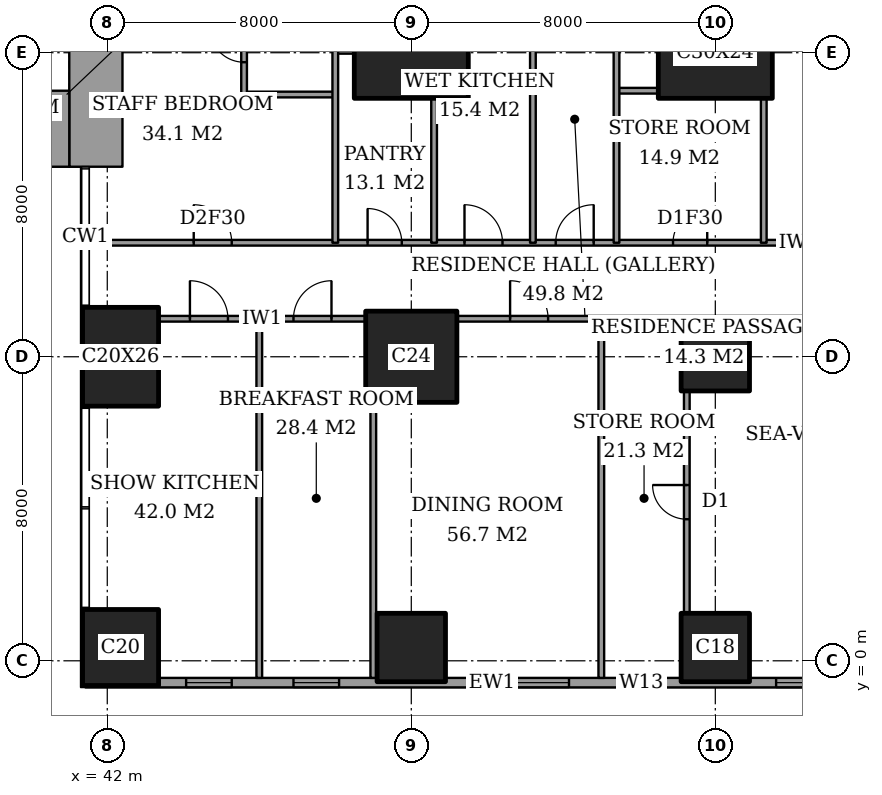
"""IFC4 building model, lengths in metres.
Left out: names, types, materials, properties, quantities, classifications, styles, units other than length and angle.
Written with IfcOpenShell. Run it as: python <this file> out.ifc"""

import sys

from ifc_helpers import new_model, si_unit, direction, frame, frame_2d, origin, origin_2d, place, context, subcontext, project, spatial, rectangle, extrude, element, fill, save


model = new_model("IFC4")
c1 = context("Model", 3, precision=1e-05, world=origin(), true_north=direction((0.0, 1.0)))
c2 = subcontext(c1, "Body", "Model", "MODEL_VIEW")
j1 = project(units=[si_unit("LENGTHUNIT", "METRE"), si_unit("PLANEANGLEUNIT", "RADIAN")], contexts=[c1])
p1 = place(None, origin())
s1 = spatial("IfcSite", under=j1, at=p1, CompositionType="ELEMENT")
p2 = place(p1, origin())
s2 = spatial("IfcBuilding", under=s1, at=p2, CompositionType="ELEMENT")
p3 = place(p2, frame((0.0, 0.0, 218.2)))
s3 = spatial("IfcBuildingStorey", under=s2, at=p3, CompositionType="ELEMENT", Elevation=218.2)
p4 = place(p3, frame((42.35, 0.35, 0.0), z_axis=(0.0, 0.0, 1.0), x_axis=(1.0, 0.0, 0.0)))
e1 = element("IfcColumn", 1, at=p4, inside=s3, PredefinedType="COLUMN", context=c2, shape_type="SweptSolid", body=[
    extrude(rectangle(XDim=2.0, YDim=2.0, at=origin_2d()), origin(), (0.0, 0.0, 1.0), 3.6),
])
p5 = place(p3, frame((42.35, 8.0, 0.0), z_axis=(0.0, 0.0, 1.0), x_axis=(1.0, 0.0, 0.0)))
e2 = element("IfcColumn", 2, at=p5, inside=s3, PredefinedType="COLUMN", context=c2, shape_type="SweptSolid", body=[
    extrude(rectangle(XDim=2.0, YDim=2.6, at=origin_2d()), origin(), (0.0, 0.0, 1.0), 3.6),
])
p6 = place(p3, frame((50.0, 0.35, 0.0), z_axis=(0.0, 0.0, 1.0), x_axis=(1.0, 0.0, 0.0)))
e3 = element("IfcColumn", 3, at=p6, inside=s3, PredefinedType="COLUMN", context=c2, shape_type="SweptSolid", body=[
    extrude(rectangle(XDim=1.8, YDim=1.8, at=origin_2d()), origin(), (0.0, 0.0, 1.0), 3.6),
])
p7 = place(p3, frame((50.0, 8.0, 0.0), z_axis=(0.0, 0.0, 1.0), x_axis=(1.0, 0.0, 0.0)))
e4 = element("IfcColumn", 4, at=p7, inside=s3, PredefinedType="COLUMN", context=c2, shape_type="SweptSolid", body=[
    extrude(rectangle(XDim=2.4, YDim=2.4, at=origin_2d()), origin(), (0.0, 0.0, 1.0), 3.6),
])
p8 = place(p3, frame((50.0, 16.0, 0.0), z_axis=(0.0, 0.0, 1.0), x_axis=(1.0, 0.0, 0.0)))
e5 = element("IfcColumn", 5, at=p8, inside=s3, PredefinedType="COLUMN", context=c2, shape_type="SweptSolid", body=[
    extrude(rectangle(XDim=3.0, YDim=2.4, at=origin_2d()), origin(), (0.0, 0.0, 1.0), 3.6),
])
for number, where, z_axis, x_axis in (
    (6, (58.0, 0.35, 0.0), (0.0, 0.0, 1.0), (1.0, 0.0, 0.0)),
    (7, (58.0, 8.0, 0.0), (0.0, 0.0, 1.0), (1.0, 0.0, 0.0)),
):
    element("IfcColumn", number, at=place(p3, frame(where, z_axis=z_axis, x_axis=x_axis)), inside=s3, PredefinedType="COLUMN", context=c2, shape_type="SweptSolid", body=[
        extrude(rectangle(XDim=1.8, YDim=1.8, at=origin_2d()), origin(), (0.0, 0.0, 1.0), 3.6),
    ])
p9 = place(p3, frame((58.0, 16.0, 0.0), z_axis=(0.0, 0.0, 1.0), x_axis=(1.0, 0.0, 0.0)))
e8 = element("IfcColumn", 8, at=p9, inside=s3, PredefinedType="COLUMN", context=c2, shape_type="SweptSolid", body=[
    extrude(rectangle(XDim=3.0, YDim=2.4, at=origin_2d()), origin(), (0.0, 0.0, 1.0), 3.6),
])
p10 = place(p3, frame((37.85, 14.0, 0.0), z_axis=(0.0, 0.0, 1.0), x_axis=(1.0, 0.0, 0.0)))
e9 = element("IfcWall", 9, at=p10, inside=s3, PredefinedType="SHEAR", context=c2, shape_type="SweptSolid", body=[
    extrude(rectangle(XDim=3.15, YDim=2.0, at=frame_2d((1.575, 0.0))), origin(), (0.0, 0.0, 1.0), 3.6),
])
p11 = place(p3, frame((41.7, 13.0, 0.0), z_axis=(0.0, 0.0, 1.0), x_axis=(0.0, 1.0, 0.0)))
e10 = element("IfcWall", 10, at=p11, inside=s3, PredefinedType="SHEAR", context=c2, shape_type="SweptSolid", body=[
    extrude(rectangle(XDim=11.85, YDim=1.4, at=frame_2d((5.925, 0.0))), origin(), (0.0, 0.0, 1.0), 3.6),
])
p12 = place(p11, frame((7.5, 0.0, 0.0)))
e11 = element("IfcOpeningElement", 11, at=p12, cuts=e10, PredefinedType="OPENING", context=c2, shape_type="SweptSolid", body=[
    extrude(rectangle(XDim=1.8, YDim=2.4, at=frame_2d((0.9, 1.2))), frame((0.0, 0.71, 0.0), z_axis=(0.0, -1.0, 0.0), x_axis=(1.0, 0.0, 0.0)), (0.0, 0.0, 1.0), 1.42),
])
p13 = place(p3, frame((41.425, -0.575, 0.0), z_axis=(0.0, 0.0, 1.0), x_axis=(1.0, 0.0, 0.0)))
e12 = element("IfcWall", 12, at=p13, inside=s3, PredefinedType="SOLIDWALL", context=c2, shape_type="SweptSolid", body=[
    extrude(rectangle(XDim=21.4, YDim=0.25, at=frame_2d((10.7, 0.0))), origin(), (0.0, 0.0, 1.0), 3.6),
])
p14 = place(p13, frame((2.65, 0.0, 0.2)))
e13 = element("IfcOpeningElement", 13, at=p14, cuts=e12, PredefinedType="OPENING", context=c2, shape_type="SweptSolid", body=[
    extrude(rectangle(XDim=1.2, YDim=2.4, at=frame_2d((0.6, 1.2))), frame((0.0, 0.135, 0.0), z_axis=(0.0, -1.0, 0.0), x_axis=(1.0, 0.0, 0.0)), (0.0, 0.0, 1.0), 0.27),
])
p15 = place(p13, frame((5.475, 0.0, 0.2)))
e14 = element("IfcOpeningElement", 14, at=p15, cuts=e12, PredefinedType="OPENING", context=c2, shape_type="SweptSolid", body=[
    extrude(rectangle(XDim=1.2, YDim=2.4, at=frame_2d((0.6, 1.2))), frame((0.0, 0.135, 0.0), z_axis=(0.0, -1.0, 0.0), x_axis=(1.0, 0.0, 0.0)), (0.0, 0.0, 1.0), 0.27),
])
p16 = place(p13, frame((10.325, 0.0, 0.2)))
e15 = element("IfcOpeningElement", 15, at=p16, cuts=e12, PredefinedType="OPENING", context=c2, shape_type="SweptSolid", body=[
    extrude(rectangle(XDim=2.4, YDim=2.4, at=frame_2d((1.2, 1.2))), frame((0.0, 0.135, 0.0), z_axis=(0.0, -1.0, 0.0), x_axis=(1.0, 0.0, 0.0)), (0.0, 0.0, 1.0), 0.27),
])
p17 = place(p13, frame((14.025, 0.0, 0.2)))
e16 = element("IfcOpeningElement", 16, at=p17, cuts=e12, PredefinedType="OPENING", context=c2, shape_type="SweptSolid", body=[
    extrude(rectangle(XDim=1.2, YDim=2.4, at=frame_2d((0.6, 1.2))), frame((0.0, 0.135, 0.0), z_axis=(0.0, -1.0, 0.0), x_axis=(1.0, 0.0, 0.0)), (0.0, 0.0, 1.0), 0.27),
])
p18 = place(p13, frame((18.175, 0.0, 0.2)))
e17 = element("IfcOpeningElement", 17, at=p18, cuts=e12, PredefinedType="OPENING", context=c2, shape_type="SweptSolid", body=[
    extrude(rectangle(XDim=2.4, YDim=2.4, at=frame_2d((1.2, 1.2))), frame((0.0, 0.135, 0.0), z_axis=(0.0, -1.0, 0.0), x_axis=(1.0, 0.0, 0.0)), (0.0, 0.0, 1.0), 0.27),
])
p19 = place(p3, frame((43.35, 9.0, 0.0), z_axis=(0.0, 0.0, 1.0), x_axis=(1.0, 0.0, 0.0)))
e18 = element("IfcWall", 18, at=p19, inside=s3, PredefinedType="PARTITIONING", context=c2, shape_type="SweptSolid", body=[
    extrude(rectangle(XDim=5.45, YDim=0.15, at=frame_2d((2.725, 0.0))), origin(), (0.0, 0.0, 1.0), 3.35),
])
p20 = place(p19, frame((3.55, 0.0, 0.0)))
e19 = element("IfcOpeningElement", 19, at=p20, cuts=e18, PredefinedType="OPENING", context=c2, shape_type="SweptSolid", body=[
    extrude(rectangle(XDim=1.0, YDim=2.1, at=frame_2d((0.5, 1.05))), frame((0.0, 0.085, 0.0), z_axis=(0.0, -1.0, 0.0), x_axis=(1.0, 0.0, 0.0)), (0.0, 0.0, 1.0), 0.17),
])
p21 = place(p19, frame((0.825, 0.0, 0.0)))
e20 = element("IfcOpeningElement", 20, at=p21, cuts=e18, PredefinedType="OPENING", context=c2, shape_type="SweptSolid", body=[
    extrude(rectangle(XDim=1.0, YDim=2.1, at=frame_2d((0.5, 1.05))), frame((0.0, 0.085, 0.0), z_axis=(0.0, -1.0, 0.0), x_axis=(1.0, 0.0, 0.0)), (0.0, 0.0, 1.0), 0.17),
])
p22 = place(p3, frame((51.2, 9.0, 0.0), z_axis=(0.0, 0.0, 1.0), x_axis=(1.0, 0.0, 0.0)))
e21 = element("IfcWall", 21, at=p22, inside=s3, PredefinedType="PARTITIONING", context=c2, shape_type="SweptSolid", body=[
    extrude(rectangle(XDim=15.25, YDim=0.15, at=frame_2d((7.625, 0.0))), origin(), (0.0, 0.0, 1.0), 3.35),
])
p23 = place(p22, frame((10.15, 0.0, 0.0)))
e22 = element("IfcOpeningElement", 22, at=p23, cuts=e21, PredefinedType="OPENING", context=c2, shape_type="SweptSolid", body=[
    extrude(rectangle(XDim=1.0, YDim=2.1, at=frame_2d((0.5, 1.05))), frame((0.0, 0.085, 0.0), z_axis=(0.0, -1.0, 0.0), x_axis=(1.0, 0.0, 0.0)), (0.0, 0.0, 1.0), 0.17),
])
p24 = place(p22, frame((1.4, 0.0, 0.0)))
e23 = element("IfcOpeningElement", 23, at=p24, cuts=e21, PredefinedType="OPENING", context=c2, shape_type="SweptSolid", body=[
    extrude(rectangle(XDim=1.0, YDim=2.1, at=frame_2d((0.5, 1.05))), frame((0.0, 0.085, 0.0), z_axis=(0.0, -1.0, 0.0), x_axis=(1.0, 0.0, 0.0)), (0.0, 0.0, 1.0), 0.17),
])
p25 = place(p3, frame((41.439, 11.0, 0.0), z_axis=(0.0, 0.0, 1.0), x_axis=(1.0, 0.0, 0.0)))
e24 = element("IfcWall", 24, at=p25, inside=s3, PredefinedType="PARTITIONING", context=c2, shape_type="SweptSolid", body=[
    extrude(rectangle(XDim=25.011, YDim=0.15, at=frame_2d((12.505, 0.0))), origin(), (0.0, 0.0, 1.0), 3.35),
])
p26 = place(p25, frame((12.361, 0.0, 0.0)))
e25 = element("IfcOpeningElement", 25, at=p26, cuts=e24, PredefinedType="OPENING", context=c2, shape_type="SweptSolid", body=[
    extrude(rectangle(XDim=1.0, YDim=2.1, at=frame_2d((0.5, 1.05))), frame((0.0, 0.085, 0.0), z_axis=(0.0, -1.0, 0.0), x_axis=(1.0, 0.0, 0.0)), (0.0, 0.0, 1.0), 0.17),
])
p27 = place(p25, frame((20.924, 0.0, 0.0)))
e26 = element("IfcOpeningElement", 26, at=p27, cuts=e24, PredefinedType="OPENING", context=c2, shape_type="SweptSolid", body=[
    extrude(rectangle(XDim=1.0, YDim=2.1, at=frame_2d((0.5, 1.05))), frame((0.0, 0.085, 0.0), z_axis=(0.0, -1.0, 0.0), x_axis=(1.0, 0.0, 0.0)), (0.0, 0.0, 1.0), 0.17),
])
p28 = place(p25, frame((15.448, 0.0, 0.0)))
e27 = element("IfcOpeningElement", 27, at=p28, cuts=e24, PredefinedType="OPENING", context=c2, shape_type="SweptSolid", body=[
    extrude(rectangle(XDim=0.9, YDim=2.1, at=frame_2d((0.45, 1.05))), frame((0.0, 0.085, 0.0), z_axis=(0.0, -1.0, 0.0), x_axis=(1.0, 0.0, 0.0)), (0.0, 0.0, 1.0), 0.17),
])
p29 = place(p25, frame((9.961, 0.0, 0.0)))
e28 = element("IfcOpeningElement", 28, at=p29, cuts=e24, PredefinedType="OPENING", context=c2, shape_type="SweptSolid", body=[
    extrude(rectangle(XDim=1.0, YDim=2.1, at=frame_2d((0.5, 1.05))), frame((0.0, 0.085, 0.0), z_axis=(0.0, -1.0, 0.0), x_axis=(1.0, 0.0, 0.0)), (0.0, 0.0, 1.0), 0.17),
])
p30 = place(p25, frame((7.411, 0.0, 0.0)))
e29 = element("IfcOpeningElement", 29, at=p30, cuts=e24, PredefinedType="OPENING", context=c2, shape_type="SweptSolid", body=[
    extrude(rectangle(XDim=0.9, YDim=2.1, at=frame_2d((0.45, 1.05))), frame((0.0, 0.085, 0.0), z_axis=(0.0, -1.0, 0.0), x_axis=(1.0, 0.0, 0.0)), (0.0, 0.0, 1.0), 0.17),
])
p31 = place(p25, frame((2.836, 0.0, 0.0)))
e30 = element("IfcOpeningElement", 30, at=p31, cuts=e24, PredefinedType="OPENING", context=c2, shape_type="SweptSolid", body=[
    extrude(rectangle(XDim=1.0, YDim=2.1, at=frame_2d((0.5, 1.05))), frame((0.0, 0.085, 0.0), z_axis=(0.0, -1.0, 0.0), x_axis=(1.0, 0.0, 0.0)), (0.0, 0.0, 1.0), 0.17),
])
p32 = place(p3, frame((45.6, 14.9, 0.0), z_axis=(0.0, 0.0, 1.0), x_axis=(1.0, 0.0, 0.0)))
e31 = element("IfcWall", 31, at=p32, inside=s3, PredefinedType="PARTITIONING", context=c2, shape_type="SweptSolid", body=[
    extrude(rectangle(XDim=2.4, YDim=0.15, at=frame_2d((1.2, 0.0))), origin(), (0.0, 0.0, 1.0), 3.35),
])
p33 = place(p3, frame((55.4, 15.0, 0.0), z_axis=(0.0, 0.0, 1.0), x_axis=(1.0, 0.0, 0.0)))
e32 = element("IfcWall", 32, at=p33, inside=s3, PredefinedType="PARTITIONING", context=c2, shape_type="SweptSolid", body=[
    extrude(rectangle(XDim=1.1, YDim=0.15, at=frame_2d((0.55, 0.0))), origin(), (0.0, 0.0, 1.0), 3.35),
])
p34 = place(p3, frame((48.0, 16.05, 0.0), z_axis=(0.0, 0.0, 1.0), x_axis=(1.0, 0.0, 0.0)))
e33 = element("IfcWall", 33, at=p34, inside=s3, PredefinedType="PARTITIONING", context=c2, shape_type="SweptSolid", body=[
    extrude(rectangle(XDim=0.5, YDim=0.15, at=frame_2d((0.25, 0.0))), origin(), (0.0, 0.0, 1.0), 2.634),
])
p35 = place(p3, frame((45.6, 14.9, 0.0), z_axis=(0.0, 0.0, 1.0), x_axis=(0.0, 1.0, 0.0)))
e34 = element("IfcWall", 34, at=p35, inside=s3, PredefinedType="PARTITIONING", context=c2, shape_type="SweptSolid", body=[
    extrude(rectangle(XDim=2.6, YDim=0.15, at=frame_2d((1.3, 0.0))), origin(), (0.0, 0.0, 1.0), 3.35),
])
p36 = place(p35, frame((0.85, 0.0, 0.0)))
e35 = element("IfcOpeningElement", 35, at=p36, cuts=e34, PredefinedType="OPENING", context=c2, shape_type="SweptSolid", body=[
    extrude(rectangle(XDim=0.9, YDim=2.1, at=frame_2d((0.45, 1.05))), frame((0.0, 0.085, 0.0), z_axis=(0.0, -1.0, 0.0), x_axis=(1.0, 0.0, 0.0)), (0.0, 0.0, 1.0), 0.17),
])
p37 = place(p3, frame((46.0, -0.45, 0.0), z_axis=(0.0, 0.0, 1.0), x_axis=(0.0, 1.0, 0.0)))
e36 = element("IfcWall", 36, at=p37, inside=s3, PredefinedType="PARTITIONING", context=c2, shape_type="SweptSolid", body=[
    extrude(rectangle(XDim=9.45, YDim=0.15, at=frame_2d((4.725, 0.0))), origin(), (0.0, 0.0, 1.0), 3.35),
])
p38 = place(p3, frame((48.0, 11.0, 0.0), z_axis=(0.0, 0.0, 1.0), x_axis=(0.0, 1.0, 0.0)))
e37 = element("IfcWall", 37, at=p38, inside=s3, PredefinedType="PARTITIONING", context=c2, shape_type="SweptSolid", body=[
    extrude(rectangle(XDim=6.5, YDim=0.15, at=frame_2d((3.25, 0.0))), origin(), (0.0, 0.0, 1.0), 3.35),
])
p39 = place(p3, frame((49.0, -0.45, 0.0), z_axis=(0.0, 0.0, 1.0), x_axis=(0.0, 1.0, 0.0)))
e38 = element("IfcWall", 38, at=p39, inside=s3, PredefinedType="PARTITIONING", context=c2, shape_type="SweptSolid", body=[
    extrude(rectangle(XDim=7.25, YDim=0.15, at=frame_2d((3.625, 0.0))), origin(), (0.0, 0.0, 1.0), 3.35),
])
p40 = place(p3, frame((50.6, 11.0, 0.0), z_axis=(0.0, 0.0, 1.0), x_axis=(0.0, 1.0, 0.0)))
e39 = element("IfcWall", 39, at=p40, inside=s3, PredefinedType="PARTITIONING", context=c2, shape_type="SweptSolid", body=[
    extrude(rectangle(XDim=3.8, YDim=0.15, at=frame_2d((1.9, 0.0))), origin(), (0.0, 0.0, 1.0), 3.35),
])
p41 = place(p3, frame((53.2, 11.0, 0.0), z_axis=(0.0, 0.0, 1.0), x_axis=(0.0, 1.0, 0.0)))
e40 = element("IfcWall", 40, at=p41, inside=s3, PredefinedType="PARTITIONING", context=c2, shape_type="SweptSolid", body=[
    extrude(rectangle(XDim=6.5, YDim=0.15, at=frame_2d((3.25, 0.0))), origin(), (0.0, 0.0, 1.0), 3.35),
])
p42 = place(p3, frame((55.0, -0.45, 0.0), z_axis=(0.0, 0.0, 1.0), x_axis=(0.0, 1.0, 0.0)))
e41 = element("IfcWall", 41, at=p42, inside=s3, PredefinedType="PARTITIONING", context=c2, shape_type="SweptSolid", body=[
    extrude(rectangle(XDim=9.45, YDim=0.15, at=frame_2d((4.725, 0.0))), origin(), (0.0, 0.0, 1.0), 3.35),
])
p43 = place(p3, frame((55.4, 11.0, 0.0), z_axis=(0.0, 0.0, 1.0), x_axis=(0.0, 1.0, 0.0)))
e42 = element("IfcWall", 42, at=p43, inside=s3, PredefinedType="PARTITIONING", context=c2, shape_type="SweptSolid", body=[
    extrude(rectangle(XDim=10.6, YDim=0.15, at=frame_2d((5.3, 0.0))), origin(), (0.0, 0.0, 1.0), 3.35),
])
p44 = place(p43, frame((8.05, 0.0, 0.0)))
e43 = element("IfcOpeningElement", 43, at=p44, cuts=e42, PredefinedType="OPENING", context=c2, shape_type="SweptSolid", body=[
    extrude(rectangle(XDim=1.0, YDim=2.1, at=frame_2d((0.5, 1.05))), frame((0.0, 0.085, 0.0), z_axis=(0.0, -1.0, 0.0), x_axis=(1.0, 0.0, 0.0)), (0.0, 0.0, 1.0), 0.17),
])
p45 = place(p3, frame((57.25, 1.25, 0.0), z_axis=(0.0, 0.0, 1.0), x_axis=(0.0, 1.0, 0.0)))
e44 = element("IfcWall", 44, at=p45, inside=s3, PredefinedType="PARTITIONING", context=c2, shape_type="SweptSolid", body=[
    extrude(rectangle(XDim=5.85, YDim=0.15, at=frame_2d((2.925, 0.0))), origin(), (0.0, 0.0, 1.0), 3.35),
])
p46 = place(p45, frame((2.475, 0.0, 0.0)))
e45 = element("IfcOpeningElement", 45, at=p46, cuts=e44, PredefinedType="OPENING", context=c2, shape_type="SweptSolid", body=[
    extrude(rectangle(XDim=0.9, YDim=2.1, at=frame_2d((0.45, 1.05))), frame((0.0, 0.085, 0.0), z_axis=(0.0, -1.0, 0.0), x_axis=(1.0, 0.0, 0.0)), (0.0, 0.0, 1.0), 0.17),
])
p47 = place(p3, frame((59.275, 11.0, 0.0), z_axis=(0.0, 0.0, 1.0), x_axis=(0.0, 1.0, 0.0)))
e46 = element("IfcWall", 46, at=p47, inside=s3, PredefinedType="PARTITIONING", context=c2, shape_type="SweptSolid", body=[
    extrude(rectangle(XDim=3.8, YDim=0.15, at=frame_2d((1.9, 0.0))), origin(), (0.0, 0.0, 1.0), 3.35),
])
p48 = place(p14, origin())
e47 = element("IfcWindow", 47, at=p48, inside=s3, PartitioningType="SINGLE_PANEL", PredefinedType="WINDOW", context=c2, shape_type="SweptSolid", body=[
    extrude(rectangle(XDim=1.2, YDim=2.4, at=frame_2d((0.6, 1.2))), frame((0.0, 0.03, 0.0), z_axis=(0.0, -1.0, 0.0), x_axis=(1.0, 0.0, 0.0)), (0.0, 0.0, 1.0), 0.06),
])
fill(e13, e47)
p49 = place(p15, origin())
e48 = element("IfcWindow", 48, at=p49, inside=s3, PartitioningType="SINGLE_PANEL", PredefinedType="WINDOW", context=c2, shape_type="SweptSolid", body=[
    extrude(rectangle(XDim=1.2, YDim=2.4, at=frame_2d((0.6, 1.2))), frame((0.0, 0.03, 0.0), z_axis=(0.0, -1.0, 0.0), x_axis=(1.0, 0.0, 0.0)), (0.0, 0.0, 1.0), 0.06),
])
fill(e14, e48)
p50 = place(p16, origin())
e49 = element("IfcWindow", 49, at=p50, inside=s3, PartitioningType="SINGLE_PANEL", PredefinedType="WINDOW", context=c2, shape_type="SweptSolid", body=[
    extrude(rectangle(XDim=2.4, YDim=2.4, at=frame_2d((1.2, 1.2))), frame((0.0, 0.03, 0.0), z_axis=(0.0, -1.0, 0.0), x_axis=(1.0, 0.0, 0.0)), (0.0, 0.0, 1.0), 0.06),
])
fill(e15, e49)
p51 = place(p17, origin())
e50 = element("IfcWindow", 50, at=p51, inside=s3, PartitioningType="SINGLE_PANEL", PredefinedType="WINDOW", context=c2, shape_type="SweptSolid", body=[
    extrude(rectangle(XDim=1.2, YDim=2.4, at=frame_2d((0.6, 1.2))), frame((0.0, 0.03, 0.0), z_axis=(0.0, -1.0, 0.0), x_axis=(1.0, 0.0, 0.0)), (0.0, 0.0, 1.0), 0.06),
])
fill(e16, e50)
p52 = place(p18, origin())
e51 = element("IfcWindow", 51, at=p52, inside=s3, PartitioningType="SINGLE_PANEL", PredefinedType="WINDOW", context=c2, shape_type="SweptSolid", body=[
    extrude(rectangle(XDim=2.4, YDim=2.4, at=frame_2d((1.2, 1.2))), frame((0.0, 0.03, 0.0), z_axis=(0.0, -1.0, 0.0), x_axis=(1.0, 0.0, 0.0)), (0.0, 0.0, 1.0), 0.06),
])
fill(e17, e51)
p53 = place(p46, origin())
e52 = element("IfcDoor", 52, at=p53, inside=s3, OperationType="SINGLE_SWING_LEFT", PredefinedType="DOOR", context=c2, shape_type="SweptSolid", body=[
    extrude(rectangle(XDim=0.9, YDim=2.1, at=frame_2d((0.45, 1.05))), frame((0.0, 0.025, 0.0), z_axis=(0.0, -1.0, 0.0), x_axis=(1.0, 0.0, 0.0)), (0.0, 0.0, 1.0), 0.05),
])
fill(e45, e52)
p54 = place(p24, origin())
e53 = element("IfcDoor", 53, at=p54, inside=s3, OperationType="SINGLE_SWING_RIGHT", PredefinedType="DOOR", context=c2, shape_type="SweptSolid", body=[
    extrude(rectangle(XDim=1.0, YDim=2.1, at=frame_2d((0.5, 1.05))), frame((0.0, 0.025, 0.0), z_axis=(0.0, -1.0, 0.0), x_axis=(1.0, 0.0, 0.0)), (0.0, 0.0, 1.0), 0.05),
])
fill(e23, e53)
p55 = place(p20, origin())
e54 = element("IfcDoor", 54, at=p55, inside=s3, OperationType="SINGLE_SWING_LEFT", PredefinedType="DOOR", context=c2, shape_type="SweptSolid", body=[
    extrude(rectangle(XDim=1.0, YDim=2.1, at=frame_2d((0.5, 1.05))), frame((0.0, 0.025, 0.0), z_axis=(0.0, -1.0, 0.0), x_axis=(1.0, 0.0, 0.0)), (0.0, 0.0, 1.0), 0.05),
])
fill(e19, e54)
p56 = place(p21, origin())
e55 = element("IfcDoor", 55, at=p56, inside=s3, OperationType="SINGLE_SWING_RIGHT", PredefinedType="DOOR", context=c2, shape_type="SweptSolid", body=[
    extrude(rectangle(XDim=1.0, YDim=2.1, at=frame_2d((0.5, 1.05))), frame((0.0, 0.025, 0.0), z_axis=(0.0, -1.0, 0.0), x_axis=(1.0, 0.0, 0.0)), (0.0, 0.0, 1.0), 0.05),
])
fill(e20, e55)
p57 = place(p26, origin())
e56 = element("IfcDoor", 56, at=p57, inside=s3, OperationType="SINGLE_SWING_LEFT", PredefinedType="DOOR", context=c2, shape_type="SweptSolid", body=[
    extrude(rectangle(XDim=1.0, YDim=2.1, at=frame_2d((0.5, 1.05))), frame((0.0, 0.025, 0.0), z_axis=(0.0, -1.0, 0.0), x_axis=(1.0, 0.0, 0.0)), (0.0, 0.0, 1.0), 0.05),
])
fill(e25, e56)
p58 = place(p28, origin())
e57 = element("IfcDoor", 57, at=p58, inside=s3, OperationType="SINGLE_SWING_LEFT", PredefinedType="DOOR", context=c2, shape_type="SweptSolid", body=[
    extrude(rectangle(XDim=0.9, YDim=2.1, at=frame_2d((0.45, 1.05))), frame((0.0, 0.025, 0.0), z_axis=(0.0, -1.0, 0.0), x_axis=(1.0, 0.0, 0.0)), (0.0, 0.0, 1.0), 0.05),
])
fill(e27, e57)
p59 = place(p29, origin())
e58 = element("IfcDoor", 58, at=p59, inside=s3, OperationType="SINGLE_SWING_RIGHT", PredefinedType="DOOR", context=c2, shape_type="SweptSolid", body=[
    extrude(rectangle(XDim=1.0, YDim=2.1, at=frame_2d((0.5, 1.05))), frame((0.0, 0.025, 0.0), z_axis=(0.0, -1.0, 0.0), x_axis=(1.0, 0.0, 0.0)), (0.0, 0.0, 1.0), 0.05),
])
fill(e28, e58)
p60 = place(p30, origin())
e59 = element("IfcDoor", 59, at=p60, inside=s3, OperationType="SINGLE_SWING_RIGHT", PredefinedType="DOOR", context=c2, shape_type="SweptSolid", body=[
    extrude(rectangle(XDim=0.9, YDim=2.1, at=frame_2d((0.45, 1.05))), frame((0.0, 0.025, 0.0), z_axis=(0.0, -1.0, 0.0), x_axis=(1.0, 0.0, 0.0)), (0.0, 0.0, 1.0), 0.05),
])
fill(e29, e59)
p61 = place(p36, origin())
e60 = element("IfcDoor", 60, at=p61, inside=s3, OperationType="SINGLE_SWING_LEFT", PredefinedType="DOOR", context=c2, shape_type="SweptSolid", body=[
    extrude(rectangle(XDim=0.9, YDim=2.1, at=frame_2d((0.45, 1.05))), frame((0.0, 0.025, 0.0), z_axis=(0.0, -1.0, 0.0), x_axis=(1.0, 0.0, 0.0)), (0.0, 0.0, 1.0), 0.05),
])
fill(e35, e60)
p62 = place(p31, origin())
e61 = element("IfcDoor", 61, at=p62, inside=s3, OperationType="SINGLE_SWING_RIGHT", PredefinedType="DOOR", context=c2, shape_type="SweptSolid", body=[
    extrude(rectangle(XDim=1.0, YDim=2.1, at=frame_2d((0.5, 1.05))), frame((0.0, 0.025, 0.0), z_axis=(0.0, -1.0, 0.0), x_axis=(1.0, 0.0, 0.0)), (0.0, 0.0, 1.0), 0.05),
])
fill(e30, e61)
save(model, sys.argv[1])
